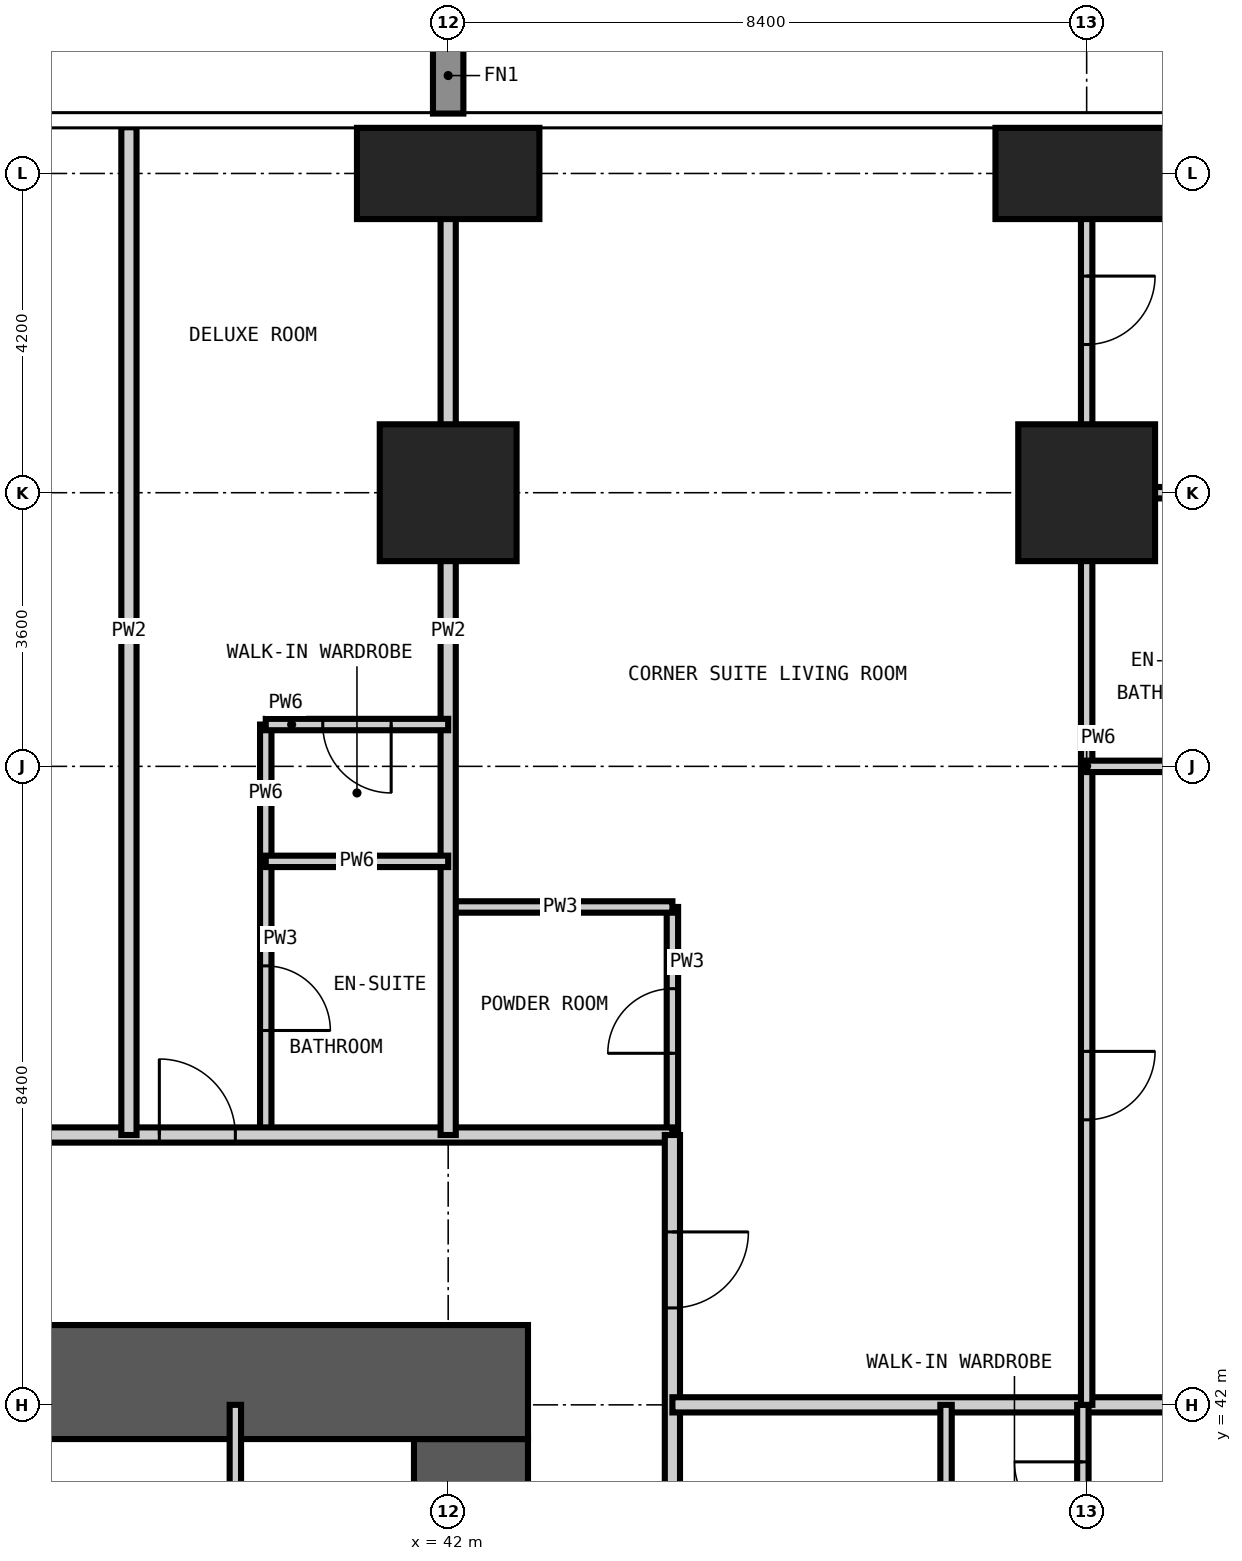
"""IFC4 building model, lengths in metres.
Left out: names, types, materials, properties, quantities, classifications, styles, units other than length and angle.
Written with IfcOpenShell. Run it as: python <this file> out.ifc"""

import sys

from ifc_helpers import new_model, si_unit, direction, frame, frame_2d, origin, origin_2d, place, context, subcontext, project, spatial, rectangle, extrude, element, fill, save


model = new_model("IFC4")
c1 = context("Model", 3, precision=1e-05, world=origin(), true_north=direction((0.0, 1.0)))
c2 = subcontext(c1, "Body", "Model", "MODEL_VIEW")
j1 = project(units=[si_unit("LENGTHUNIT", "METRE"), si_unit("PLANEANGLEUNIT", "RADIAN")], contexts=[c1])
p1 = place(None, origin())
s1 = spatial("IfcSite", under=j1, at=p1, CompositionType="ELEMENT")
p2 = place(p1, origin())
s2 = spatial("IfcBuilding", under=s1, at=p2, CompositionType="ELEMENT")
p3 = place(p2, frame((0.0, 0.0, 70.2)))
s3 = spatial("IfcBuildingStorey", under=s2, at=p3, CompositionType="ELEMENT", Elevation=70.2)
p4 = place(p3, frame((42.0, 54.0, -0.35), z_axis=(0.0, 0.0, 1.0), x_axis=(1.0, 0.0, 0.0)))
e1 = element("IfcColumn", 1, at=p4, inside=s3, PredefinedType="COLUMN", context=c2, shape_type="SweptSolid", body=[
    extrude(rectangle(XDim=1.8, YDim=1.8, at=origin_2d()), origin(), (0.0, 0.0, 1.0), 3.6),
])
p5 = place(p3, frame((42.0, 58.2, -0.35), z_axis=(0.0, 0.0, 1.0), x_axis=(1.0, 0.0, 0.0)))
e2 = element("IfcColumn", 2, at=p5, inside=s3, PredefinedType="COLUMN", context=c2, shape_type="SweptSolid", body=[
    extrude(rectangle(XDim=2.4, YDim=1.2, at=origin_2d()), origin(), (0.0, 0.0, 1.0), 3.6),
])
p6 = place(p3, frame((50.4, 54.0, -0.35), z_axis=(0.0, 0.0, 1.0), x_axis=(1.0, 0.0, 0.0)))
e3 = element("IfcColumn", 3, at=p6, inside=s3, PredefinedType="COLUMN", context=c2, shape_type="SweptSolid", body=[
    extrude(rectangle(XDim=1.8, YDim=1.8, at=origin_2d()), origin(), (0.0, 0.0, 1.0), 3.6),
])
p7 = place(p3, frame((50.4, 58.2, -0.35), z_axis=(0.0, 0.0, 1.0), x_axis=(1.0, 0.0, 0.0)))
e4 = element("IfcColumn", 4, at=p7, inside=s3, PredefinedType="COLUMN", context=c2, shape_type="SweptSolid", body=[
    extrude(rectangle(XDim=2.4, YDim=1.2, at=origin_2d()), origin(), (0.0, 0.0, 1.0), 3.6),
])
p8 = place(p3, frame((42.3, 17.25, -0.35), z_axis=(0.0, 0.0, 1.0), x_axis=(0.0, 1.0, 0.0)))
e5 = element("IfcWall", 5, at=p8, inside=s3, PredefinedType="SHEAR", context=c2, shape_type="SweptSolid", body=[
    extrude(rectangle(XDim=24.3, YDim=1.5, at=frame_2d((12.15, 0.0))), origin(), (0.0, 0.0, 1.0), 3.6),
])
p9 = place(p8, frame((0.35, 0.0, 0.35)))
e6 = element("IfcOpeningElement", 6, at=p9, cuts=e5, PredefinedType="OPENING", context=c2, shape_type="SweptSolid", body=[
    extrude(rectangle(XDim=1.2, YDim=2.2, at=frame_2d((0.6, 1.1))), frame((0.0, 0.76, 0.0), z_axis=(0.0, -1.0, 0.0), x_axis=(1.0, 0.0, 0.0)), (0.0, 0.0, 1.0), 1.52),
])
p10 = place(p8, frame((11.65, 0.0, 0.35)))
e7 = element("IfcOpeningElement", 7, at=p10, cuts=e5, PredefinedType="OPENING", context=c2, shape_type="SweptSolid", body=[
    extrude(rectangle(XDim=1.0, YDim=2.1, at=frame_2d((0.5, 1.05))), frame((0.0, 0.76, 0.0), z_axis=(0.0, -1.0, 0.0), x_axis=(1.0, 0.0, 0.0)), (0.0, 0.0, 1.0), 1.52),
])
p11 = place(p8, frame((20.05, 0.0, 0.35)))
e8 = element("IfcOpeningElement", 8, at=p11, cuts=e5, PredefinedType="OPENING", context=c2, shape_type="SweptSolid", body=[
    extrude(rectangle(XDim=1.0, YDim=2.1, at=frame_2d((0.5, 1.05))), frame((0.0, 0.76, 0.0), z_axis=(0.0, -1.0, 0.0), x_axis=(1.0, 0.0, 0.0)), (0.0, 0.0, 1.0), 1.52),
])
p12 = place(p3, frame((43.05, 42.3, -0.35), z_axis=(0.0, 0.0, 1.0), x_axis=(-1.0, 0.0, 0.0)))
e9 = element("IfcWall", 9, at=p12, inside=s3, PredefinedType="SHEAR", context=c2, shape_type="SweptSolid", body=[
    extrude(rectangle(XDim=27.3, YDim=1.5, at=frame_2d((13.65, 0.0))), origin(), (0.0, 0.0, 1.0), 3.6),
])
p13 = place(p12, frame((21.55, 0.0, 0.35)))
e10 = element("IfcOpeningElement", 10, at=p13, cuts=e9, PredefinedType="OPENING", context=c2, shape_type="SweptSolid", body=[
    extrude(rectangle(XDim=1.0, YDim=2.1, at=frame_2d((0.5, 1.05))), frame((0.0, 0.76, 0.0), z_axis=(0.0, -1.0, 0.0), x_axis=(1.0, 0.0, 0.0)), (0.0, 0.0, 1.0), 1.52),
])
p14 = place(p12, frame((10.95, 0.0, 0.35)))
e11 = element("IfcOpeningElement", 11, at=p14, cuts=e9, PredefinedType="OPENING", context=c2, shape_type="SweptSolid", body=[
    extrude(rectangle(XDim=1.2, YDim=2.2, at=frame_2d((0.6, 1.1))), frame((0.0, 0.76, 0.0), z_axis=(0.0, -1.0, 0.0), x_axis=(1.0, 0.0, 0.0)), (0.0, 0.0, 1.0), 1.52),
])
p15 = place(p3, frame((39.6, 45.55, 0.0), z_axis=(0.0, 0.0, 1.0), x_axis=(0.0, 1.0, 0.0)))
e12 = element("IfcWall", 12, at=p15, inside=s3, PredefinedType="PARTITIONING", context=c2, shape_type="SweptSolid", body=[
    extrude(rectangle(XDim=3.6, YDim=0.15, at=frame_2d((1.8, 0.0))), origin(), (0.0, 0.0, 1.0), 3.25),
])
p16 = place(p15, frame((1.375, 0.0, 0.0)))
e13 = element("IfcOpeningElement", 13, at=p16, cuts=e12, PredefinedType="OPENING", context=c2, shape_type="SweptSolid", body=[
    extrude(rectangle(XDim=0.85, YDim=2.1, at=frame_2d((0.425, 1.05))), frame((0.0, 0.085, 0.0), z_axis=(0.0, -1.0, 0.0), x_axis=(1.0, 0.0, 0.0)), (0.0, 0.0, 1.0), 0.17),
])
p17 = place(p3, frame((44.95, 45.55, 0.0), z_axis=(0.0, 0.0, 1.0), x_axis=(0.0, 1.0, 0.0)))
e14 = element("IfcWall", 14, at=p17, inside=s3, PredefinedType="PARTITIONING", context=c2, shape_type="SweptSolid", body=[
    extrude(rectangle(XDim=3.0, YDim=0.15, at=frame_2d((1.5, 0.0))), origin(), (0.0, 0.0, 1.0), 3.25),
])
p18 = place(p17, frame((1.075, 0.0, 0.0)))
e15 = element("IfcOpeningElement", 15, at=p18, cuts=e14, PredefinedType="OPENING", context=c2, shape_type="SweptSolid", body=[
    extrude(rectangle(XDim=0.85, YDim=2.1, at=frame_2d((0.425, 1.05))), frame((0.0, 0.085, 0.0), z_axis=(0.0, -1.0, 0.0), x_axis=(1.0, 0.0, 0.0)), (0.0, 0.0, 1.0), 0.17),
])
p19 = place(p3, frame((42.0, 48.55, 0.0), z_axis=(0.0, 0.0, 1.0), x_axis=(1.0, 0.0, 0.0)))
e16 = element("IfcWall", 16, at=p19, inside=s3, PredefinedType="PARTITIONING", context=c2, shape_type="SweptSolid", body=[
    extrude(rectangle(XDim=2.95, YDim=0.15, at=frame_2d((1.475, 0.0))), origin(), (0.0, 0.0, 1.0), 3.25),
])
p20 = place(p3, frame((50.4, 54.0, 0.0), z_axis=(0.0, 0.0, 1.0), x_axis=(1.0, 0.0, 0.0)))
e17 = element("IfcWall", 17, at=p20, inside=s3, PredefinedType="PARTITIONING", context=c2, shape_type="SweptSolid", body=[
    extrude(rectangle(XDim=3.0, YDim=0.15, at=frame_2d((1.5, 0.0))), origin(), (0.0, 0.0, 1.0), 3.25),
])
p21 = place(p3, frame((12.65, 45.55, 0.0), z_axis=(0.0, 0.0, 1.0), x_axis=(1.0, 0.0, 0.0)))
e18 = element("IfcWall", 18, at=p21, inside=s3, PredefinedType="PARTITIONING", context=c2, shape_type="SweptSolid", body=[
    extrude(rectangle(XDim=32.3, YDim=0.2, at=frame_2d((16.15, 0.0))), origin(), (0.0, 0.0, 1.0), 3.25),
])
p22 = place(p21, frame((6.95, 0.0, 0.0)))
e19 = element("IfcOpeningElement", 19, at=p22, cuts=e18, PredefinedType="OPENING", context=c2, shape_type="SweptSolid", body=[
    extrude(rectangle(XDim=1.0, YDim=2.2, at=frame_2d((0.5, 1.1))), frame((0.0, 0.11, 0.0), z_axis=(0.0, -1.0, 0.0), x_axis=(1.0, 0.0, 0.0)), (0.0, 0.0, 1.0), 0.22),
])
p23 = place(p21, frame((10.85, 0.0, 0.0)))
e20 = element("IfcOpeningElement", 20, at=p23, cuts=e18, PredefinedType="OPENING", context=c2, shape_type="SweptSolid", body=[
    extrude(rectangle(XDim=1.0, YDim=2.2, at=frame_2d((0.5, 1.1))), frame((0.0, 0.11, 0.0), z_axis=(0.0, -1.0, 0.0), x_axis=(1.0, 0.0, 0.0)), (0.0, 0.0, 1.0), 0.22),
])
p24 = place(p21, frame((21.65, 0.0, 0.0)))
e21 = element("IfcOpeningElement", 21, at=p24, cuts=e18, PredefinedType="OPENING", context=c2, shape_type="SweptSolid", body=[
    extrude(rectangle(XDim=1.0, YDim=2.2, at=frame_2d((0.5, 1.1))), frame((0.0, 0.11, 0.0), z_axis=(0.0, -1.0, 0.0), x_axis=(1.0, 0.0, 0.0)), (0.0, 0.0, 1.0), 0.22),
])
p25 = place(p21, frame((25.55, 0.0, 0.0)))
e22 = element("IfcOpeningElement", 22, at=p25, cuts=e18, PredefinedType="OPENING", context=c2, shape_type="SweptSolid", body=[
    extrude(rectangle(XDim=1.0, YDim=2.2, at=frame_2d((0.5, 1.1))), frame((0.0, 0.11, 0.0), z_axis=(0.0, -1.0, 0.0), x_axis=(1.0, 0.0, 0.0)), (0.0, 0.0, 1.0), 0.22),
])
p26 = place(p3, frame((44.95, 45.55, 0.0), z_axis=(0.0, 0.0, 1.0), x_axis=(0.0, -1.0, 0.0)))
e23 = element("IfcWall", 23, at=p26, inside=s3, PredefinedType="PARTITIONING", context=c2, shape_type="SweptSolid", body=[
    extrude(rectangle(XDim=32.9, YDim=0.2, at=frame_2d((16.45, 0.0))), origin(), (0.0, 0.0, 1.0), 3.25),
])
p27 = place(p26, frame((24.95, 0.0, 0.0)))
e24 = element("IfcOpeningElement", 24, at=p27, cuts=e23, PredefinedType="OPENING", context=c2, shape_type="SweptSolid", body=[
    extrude(rectangle(XDim=1.0, YDim=2.2, at=frame_2d((0.5, 1.1))), frame((0.0, 0.11, 0.0), z_axis=(0.0, -1.0, 0.0), x_axis=(1.0, 0.0, 0.0)), (0.0, 0.0, 1.0), 0.22),
])
p28 = place(p26, frame((21.05, 0.0, 0.0)))
e25 = element("IfcOpeningElement", 25, at=p28, cuts=e23, PredefinedType="OPENING", context=c2, shape_type="SweptSolid", body=[
    extrude(rectangle(XDim=1.0, YDim=2.2, at=frame_2d((0.5, 1.1))), frame((0.0, 0.11, 0.0), z_axis=(0.0, -1.0, 0.0), x_axis=(1.0, 0.0, 0.0)), (0.0, 0.0, 1.0), 0.22),
])
p29 = place(p26, frame((10.25, 0.0, 0.0)))
e26 = element("IfcOpeningElement", 26, at=p29, cuts=e23, PredefinedType="OPENING", context=c2, shape_type="SweptSolid", body=[
    extrude(rectangle(XDim=1.0, YDim=2.2, at=frame_2d((0.5, 1.1))), frame((0.0, 0.11, 0.0), z_axis=(0.0, -1.0, 0.0), x_axis=(1.0, 0.0, 0.0)), (0.0, 0.0, 1.0), 0.22),
])
p30 = place(p26, frame((6.35, 0.0, 0.0)))
e27 = element("IfcOpeningElement", 27, at=p30, cuts=e23, PredefinedType="OPENING", context=c2, shape_type="SweptSolid", body=[
    extrude(rectangle(XDim=1.0, YDim=2.2, at=frame_2d((0.5, 1.1))), frame((0.0, 0.11, 0.0), z_axis=(0.0, -1.0, 0.0), x_axis=(1.0, 0.0, 0.0)), (0.0, 0.0, 1.0), 0.22),
])
p31 = place(p26, frame((30.325, 0.0, 0.0)))
e28 = element("IfcOpeningElement", 28, at=p31, cuts=e23, PredefinedType="OPENING", context=c2, shape_type="SweptSolid", body=[
    extrude(rectangle(XDim=1.0, YDim=2.2, at=frame_2d((0.5, 1.1))), frame((0.0, 0.11, 0.0), z_axis=(0.0, -1.0, 0.0), x_axis=(1.0, 0.0, 0.0)), (0.0, 0.0, 1.0), 0.22),
])
p32 = place(p26, frame((1.275, 0.0, 0.0)))
e29 = element("IfcOpeningElement", 29, at=p32, cuts=e23, PredefinedType="OPENING", context=c2, shape_type="SweptSolid", body=[
    extrude(rectangle(XDim=1.0, YDim=2.2, at=frame_2d((0.5, 1.1))), frame((0.0, 0.11, 0.0), z_axis=(0.0, -1.0, 0.0), x_axis=(1.0, 0.0, 0.0)), (0.0, 0.0, 1.0), 0.22),
])
for number, where, z_axis, x_axis in (
    (30, (37.8, 45.55, 0.0), (0.0, 0.0, 1.0), (0.0, 1.0, 0.0)),
    (31, (42.0, 45.55, 0.0), (0.0, 0.0, 1.0), (0.0, 1.0, 0.0)),
):
    element("IfcWall", number, at=place(p3, frame(where, z_axis=z_axis, x_axis=x_axis)), inside=s3, PredefinedType="PARTITIONING", context=c2, shape_type="SweptSolid", body=[
        extrude(rectangle(XDim=13.258, YDim=0.2, at=frame_2d((6.629, 0.0))), origin(), (0.0, 0.0, 1.0), 3.25),
    ])
p33 = place(p3, frame((44.95, 42.0, 0.0), z_axis=(0.0, 0.0, 1.0), x_axis=(1.0, 0.0, 0.0)))
e32 = element("IfcWall", 32, at=p33, inside=s3, PredefinedType="PARTITIONING", context=c2, shape_type="SweptSolid", body=[
    extrude(rectangle(XDim=5.4, YDim=0.2, at=frame_2d((2.7, 0.0))), origin(), (0.0, 0.0, 1.0), 3.25),
])
p34 = place(p3, frame((50.4, 42.0, 0.0), z_axis=(0.0, 0.0, 1.0), x_axis=(1.0, 0.0, 0.0)))
e33 = element("IfcWall", 33, at=p34, inside=s3, PredefinedType="PARTITIONING", context=c2, shape_type="SweptSolid", body=[
    extrude(rectangle(XDim=8.408, YDim=0.2, at=frame_2d((4.204, 0.0))), origin(), (0.0, 0.0, 1.0), 3.25),
])
p35 = place(p3, frame((39.2, 33.6, 0.0), z_axis=(0.0, 0.0, 1.0), x_axis=(0.0, 1.0, 0.0)))
e34 = element("IfcWall", 34, at=p35, inside=s3, PredefinedType="PARTITIONING", context=c2, shape_type="SweptSolid", body=[
    extrude(rectangle(XDim=8.4, YDim=0.15, at=frame_2d((4.2, 0.0))), origin(), (0.0, 0.0, 1.0), 3.25),
])
p36 = place(p35, frame((3.7, 0.0, 0.0)))
e35 = element("IfcOpeningElement", 35, at=p36, cuts=e34, PredefinedType="OPENING", context=c2, shape_type="SweptSolid", body=[
    extrude(rectangle(XDim=1.0, YDim=2.1, at=frame_2d((0.5, 1.05))), frame((0.0, 0.085, 0.0), z_axis=(0.0, -1.0, 0.0), x_axis=(1.0, 0.0, 0.0)), (0.0, 0.0, 1.0), 0.17),
])
p37 = place(p3, frame((39.6, 49.15, 0.0), z_axis=(0.0, 0.0, 1.0), x_axis=(0.0, 1.0, 0.0)))
e36 = element("IfcWall", 36, at=p37, inside=s3, PredefinedType="PARTITIONING", context=c2, shape_type="SweptSolid", body=[
    extrude(rectangle(XDim=1.8, YDim=0.15, at=frame_2d((0.9, 0.0))), origin(), (0.0, 0.0, 1.0), 3.25),
])
p38 = place(p3, frame((48.55, 39.6, 0.0), z_axis=(0.0, 0.0, 1.0), x_axis=(0.0, 1.0, 0.0)))
e37 = element("IfcWall", 37, at=p38, inside=s3, PredefinedType="PARTITIONING", context=c2, shape_type="SweptSolid", body=[
    extrude(rectangle(XDim=2.4, YDim=0.15, at=frame_2d((1.2, 0.0))), origin(), (0.0, 0.0, 1.0), 3.25),
])
p39 = place(p3, frame((50.35, 39.6, 0.0), z_axis=(0.0, 0.0, 1.0), x_axis=(0.0, 1.0, 0.0)))
e38 = element("IfcWall", 38, at=p39, inside=s3, PredefinedType="PARTITIONING", context=c2, shape_type="SweptSolid", body=[
    extrude(rectangle(XDim=2.4, YDim=0.15, at=frame_2d((1.2, 0.0))), origin(), (0.0, 0.0, 1.0), 3.25),
])
p40 = place(p39, frame((0.75, 0.0, 0.0)))
e39 = element("IfcOpeningElement", 39, at=p40, cuts=e38, PredefinedType="OPENING", context=c2, shape_type="SweptSolid", body=[
    extrude(rectangle(XDim=0.9, YDim=2.1, at=frame_2d((0.45, 1.05))), frame((0.0, 0.085, 0.0), z_axis=(0.0, -1.0, 0.0), x_axis=(1.0, 0.0, 0.0)), (0.0, 0.0, 1.0), 0.17),
])
p41 = place(p3, frame((50.4, 42.0, 0.0), z_axis=(0.0, 0.0, 1.0), x_axis=(0.0, 1.0, 0.0)))
e40 = element("IfcWall", 40, at=p41, inside=s3, PredefinedType="PARTITIONING", context=c2, shape_type="SweptSolid", body=[
    extrude(rectangle(XDim=16.808, YDim=0.15, at=frame_2d((8.404, 0.0))), origin(), (0.0, 0.0, 1.0), 3.25),
])
p42 = place(p41, frame((13.95, 0.0, 0.0)))
e41 = element("IfcOpeningElement", 41, at=p42, cuts=e40, PredefinedType="OPENING", context=c2, shape_type="SweptSolid", body=[
    extrude(rectangle(XDim=0.9, YDim=2.1, at=frame_2d((0.45, 1.05))), frame((0.0, 0.085, 0.0), z_axis=(0.0, -1.0, 0.0), x_axis=(1.0, 0.0, 0.0)), (0.0, 0.0, 1.0), 0.17),
])
p43 = place(p41, frame((3.75, 0.0, 0.0)))
e42 = element("IfcOpeningElement", 42, at=p43, cuts=e40, PredefinedType="OPENING", context=c2, shape_type="SweptSolid", body=[
    extrude(rectangle(XDim=0.9, YDim=2.1, at=frame_2d((0.45, 1.05))), frame((0.0, 0.085, 0.0), z_axis=(0.0, -1.0, 0.0), x_axis=(1.0, 0.0, 0.0)), (0.0, 0.0, 1.0), 0.17),
])
p44 = place(p3, frame((39.6, 49.15, 0.0), z_axis=(0.0, 0.0, 1.0), x_axis=(1.0, 0.0, 0.0)))
e43 = element("IfcWall", 43, at=p44, inside=s3, PredefinedType="PARTITIONING", context=c2, shape_type="SweptSolid", body=[
    extrude(rectangle(XDim=2.4, YDim=0.15, at=frame_2d((1.2, 0.0))), origin(), (0.0, 0.0, 1.0), 3.25),
])
p45 = place(p3, frame((50.4, 50.4, 0.0), z_axis=(0.0, 0.0, 1.0), x_axis=(1.0, 0.0, 0.0)))
e44 = element("IfcWall", 44, at=p45, inside=s3, PredefinedType="PARTITIONING", context=c2, shape_type="SweptSolid", body=[
    extrude(rectangle(XDim=8.408, YDim=0.15, at=frame_2d((4.204, 0.0))), origin(), (0.0, 0.0, 1.0), 3.25),
])
p46 = place(p45, frame((4.55, 0.0, 0.0)))
e45 = element("IfcOpeningElement", 45, at=p46, cuts=e44, PredefinedType="OPENING", context=c2, shape_type="SweptSolid", body=[
    extrude(rectangle(XDim=0.9, YDim=2.1, at=frame_2d((0.45, 1.05))), frame((0.0, 0.085, 0.0), z_axis=(0.0, -1.0, 0.0), x_axis=(1.0, 0.0, 0.0)), (0.0, 0.0, 1.0), 0.17),
])
p47 = place(p3, frame((39.6, 50.95, 0.0), z_axis=(0.0, 0.0, 1.0), x_axis=(1.0, 0.0, 0.0)))
e46 = element("IfcWall", 46, at=p47, inside=s3, PredefinedType="PARTITIONING", context=c2, shape_type="SweptSolid", body=[
    extrude(rectangle(XDim=2.4, YDim=0.15, at=frame_2d((1.2, 0.0))), origin(), (0.0, 0.0, 1.0), 3.25),
])
p48 = place(p47, frame((0.75, 0.0, 0.0)))
e47 = element("IfcOpeningElement", 47, at=p48, cuts=e46, PredefinedType="OPENING", context=c2, shape_type="SweptSolid", body=[
    extrude(rectangle(XDim=0.9, YDim=2.1, at=frame_2d((0.45, 1.05))), frame((0.0, 0.085, 0.0), z_axis=(0.0, -1.0, 0.0), x_axis=(1.0, 0.0, 0.0)), (0.0, 0.0, 1.0), 0.17),
])
p49 = place(p40, origin())
e48 = element("IfcDoor", 48, at=p49, inside=s3, OperationType="SINGLE_SWING_RIGHT", PredefinedType="DOOR", context=c2, shape_type="SweptSolid", body=[
    extrude(rectangle(XDim=0.9, YDim=2.1, at=frame_2d((0.45, 1.05))), frame((0.0, 0.025, 0.0), z_axis=(0.0, -1.0, 0.0), x_axis=(1.0, 0.0, 0.0)), (0.0, 0.0, 1.0), 0.05),
])
fill(e39, e48)
p50 = place(p25, origin())
e49 = element("IfcDoor", 49, at=p50, inside=s3, OperationType="SINGLE_SWING_LEFT", PredefinedType="DOOR", context=c2, shape_type="SweptSolid", body=[
    extrude(rectangle(XDim=1.0, YDim=2.2, at=frame_2d((0.5, 1.1))), frame((0.0, 0.025, 0.0), z_axis=(0.0, -1.0, 0.0), x_axis=(1.0, 0.0, 0.0)), (0.0, 0.0, 1.0), 0.05),
])
fill(e22, e49)
p51 = place(p16, frame((0.85, 0.0, 0.0), z_axis=(0.0, 0.0, 1.0), x_axis=(-1.0, 0.0, 0.0)))
e50 = element("IfcDoor", 50, at=p51, inside=s3, OperationType="SINGLE_SWING_RIGHT", PredefinedType="DOOR", context=c2, shape_type="SweptSolid", body=[
    extrude(rectangle(XDim=0.85, YDim=2.1, at=frame_2d((0.425, 1.05))), frame((0.0, 0.025, 0.0), z_axis=(0.0, -1.0, 0.0), x_axis=(1.0, 0.0, 0.0)), (0.0, 0.0, 1.0), 0.05),
])
fill(e13, e50)
p52 = place(p48, frame((0.9, 0.0, 0.0), z_axis=(0.0, 0.0, 1.0), x_axis=(-1.0, 0.0, 0.0)))
e51 = element("IfcDoor", 51, at=p52, inside=s3, OperationType="SINGLE_SWING_LEFT", PredefinedType="DOOR", context=c2, shape_type="SweptSolid", body=[
    extrude(rectangle(XDim=0.9, YDim=2.1, at=frame_2d((0.45, 1.05))), frame((0.0, 0.025, 0.0), z_axis=(0.0, -1.0, 0.0), x_axis=(1.0, 0.0, 0.0)), (0.0, 0.0, 1.0), 0.05),
])
fill(e47, e51)
p53 = place(p32, origin())
e52 = element("IfcDoor", 52, at=p53, inside=s3, OperationType="SINGLE_SWING_LEFT", PredefinedType="DOOR", context=c2, shape_type="SweptSolid", body=[
    extrude(rectangle(XDim=1.0, YDim=2.2, at=frame_2d((0.5, 1.1))), frame((0.0, 0.025, 0.0), z_axis=(0.0, -1.0, 0.0), x_axis=(1.0, 0.0, 0.0)), (0.0, 0.0, 1.0), 0.05),
])
fill(e29, e52)
p54 = place(p18, origin())
e53 = element("IfcDoor", 53, at=p54, inside=s3, OperationType="SINGLE_SWING_LEFT", PredefinedType="DOOR", context=c2, shape_type="SweptSolid", body=[
    extrude(rectangle(XDim=0.85, YDim=2.1, at=frame_2d((0.425, 1.05))), frame((0.0, 0.025, 0.0), z_axis=(0.0, -1.0, 0.0), x_axis=(1.0, 0.0, 0.0)), (0.0, 0.0, 1.0), 0.05),
])
fill(e15, e53)
p55 = place(p42, frame((0.9, 0.0, 0.0), z_axis=(0.0, 0.0, 1.0), x_axis=(-1.0, 0.0, 0.0)))
e54 = element("IfcDoor", 54, at=p55, inside=s3, OperationType="SINGLE_SWING_LEFT", PredefinedType="DOOR", context=c2, shape_type="SweptSolid", body=[
    extrude(rectangle(XDim=0.9, YDim=2.1, at=frame_2d((0.45, 1.05))), frame((0.0, 0.025, 0.0), z_axis=(0.0, -1.0, 0.0), x_axis=(1.0, 0.0, 0.0)), (0.0, 0.0, 1.0), 0.05),
])
fill(e41, e54)
p56 = place(p43, frame((0.9, 0.0, 0.0), z_axis=(0.0, 0.0, 1.0), x_axis=(-1.0, 0.0, 0.0)))
e55 = element("IfcDoor", 55, at=p56, inside=s3, OperationType="SINGLE_SWING_LEFT", PredefinedType="DOOR", context=c2, shape_type="SweptSolid", body=[
    extrude(rectangle(XDim=0.9, YDim=2.1, at=frame_2d((0.45, 1.05))), frame((0.0, 0.025, 0.0), z_axis=(0.0, -1.0, 0.0), x_axis=(1.0, 0.0, 0.0)), (0.0, 0.0, 1.0), 0.05),
])
fill(e42, e55)
save(model, sys.argv[1])
